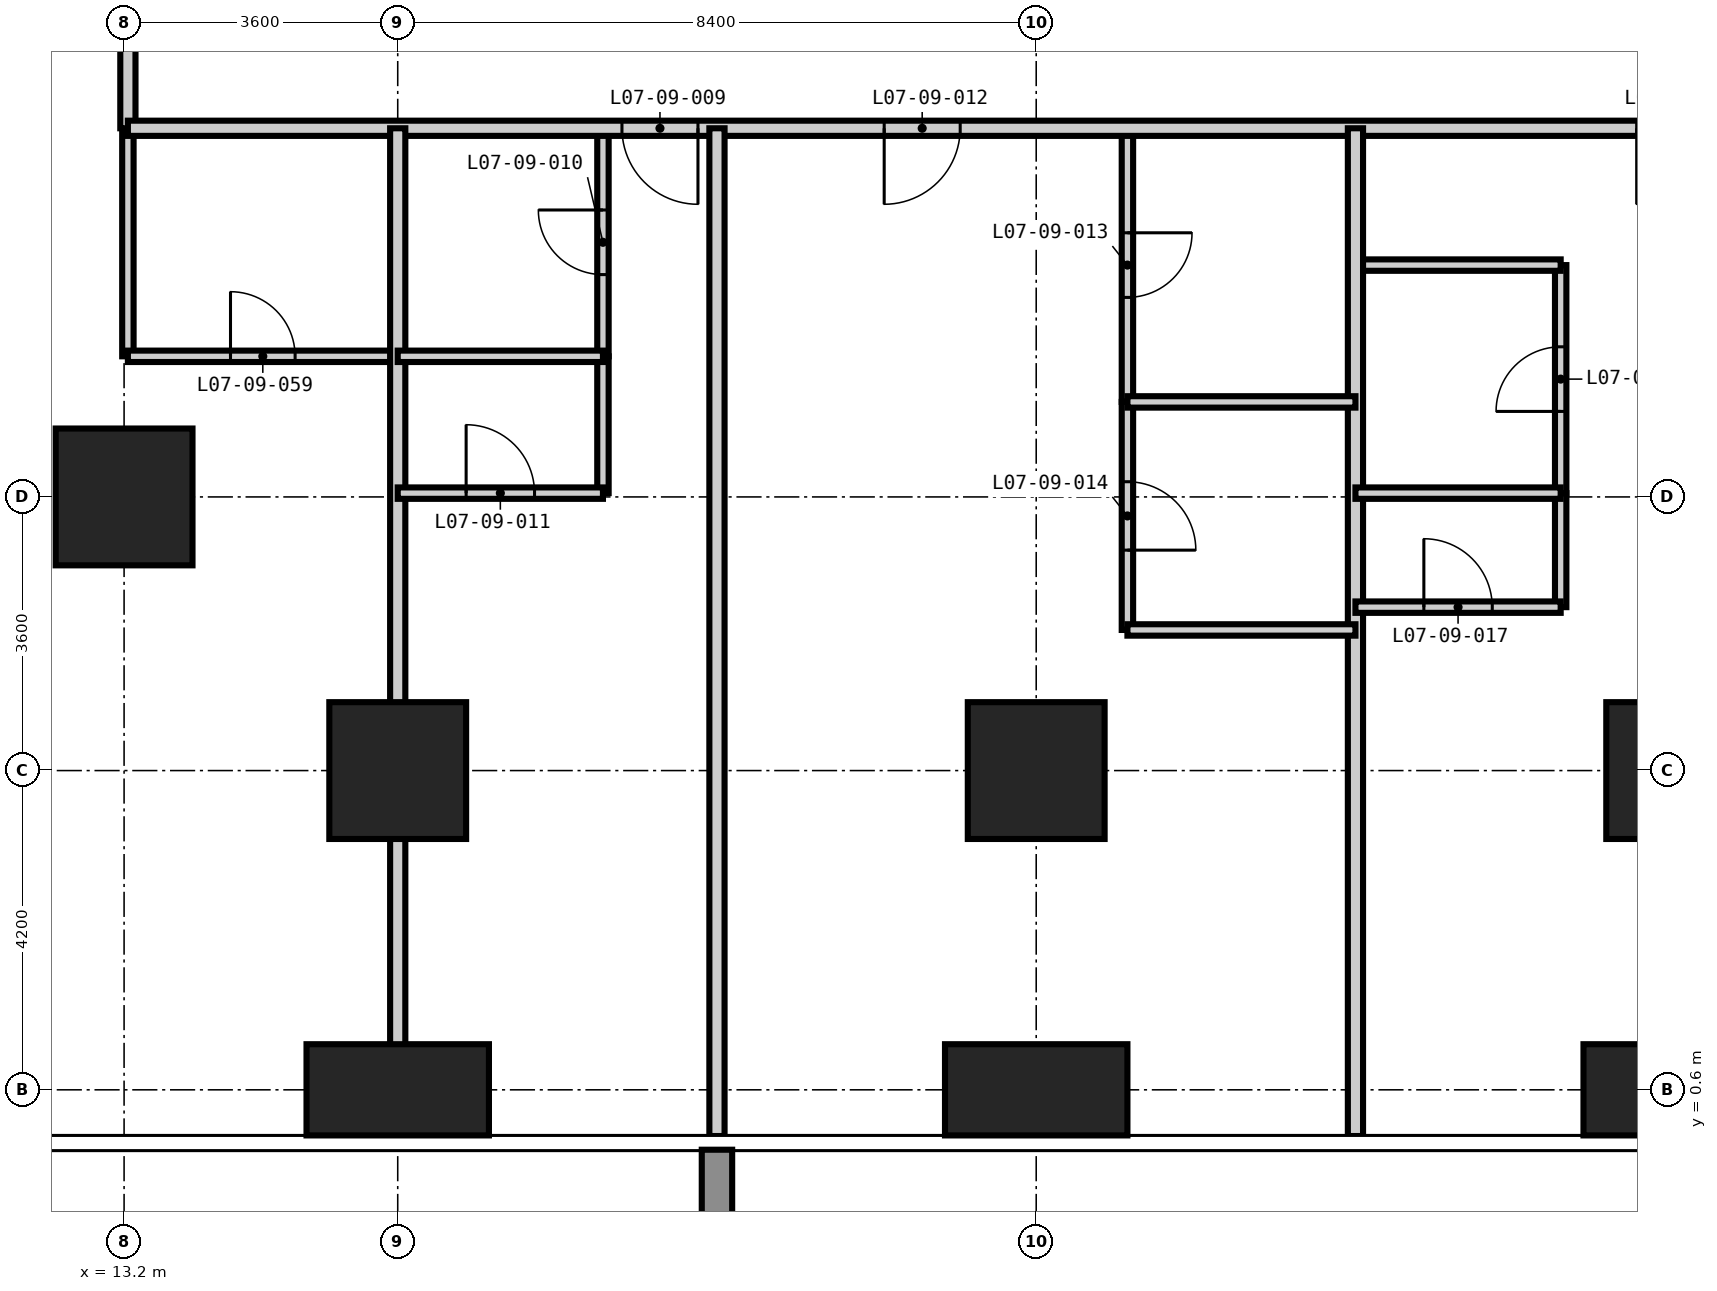
"""IFC4 building model, lengths in metres.
Left out: names, types, materials, properties, quantities, classifications, styles, units other than length and angle.
Written with IfcOpenShell. Run it as: python <this file> out.ifc"""

import sys

from ifc_helpers import new_model, si_unit, direction, frame, frame_2d, origin, origin_2d, place, context, subcontext, project, spatial, rectangle, extrude, element, fill, save


model = new_model("IFC4")
c1 = context("Model", 3, precision=1e-05, world=origin(), true_north=direction((0.0, 1.0)))
c2 = subcontext(c1, "Body", "Model", "MODEL_VIEW")
j1 = project(units=[si_unit("LENGTHUNIT", "METRE"), si_unit("PLANEANGLEUNIT", "RADIAN")], contexts=[c1])
p1 = place(None, origin())
s1 = spatial("IfcSite", under=j1, at=p1, CompositionType="ELEMENT")
p2 = place(p1, origin())
s2 = spatial("IfcBuilding", under=s1, at=p2, CompositionType="ELEMENT")
p3 = place(p2, frame((0.0, 0.0, 34.2)))
s3 = spatial("IfcBuildingStorey", under=s2, at=p3, CompositionType="ELEMENT", Elevation=34.2)
p4 = place(p3, frame((13.2, 8.4, -0.35), z_axis=(0.0, 0.0, 1.0), x_axis=(1.0, 0.0, 0.0)))
e1 = element("IfcColumn", 1, at=p4, inside=s3, PredefinedType="COLUMN", context=c2, shape_type="SweptSolid", body=[
    extrude(rectangle(XDim=1.8, YDim=1.8, at=origin_2d()), origin(), (0.0, 0.0, 1.0), 3.6),
])
p5 = place(p3, frame((16.8, 0.6, -0.35), z_axis=(0.0, 0.0, 1.0), x_axis=(1.0, 0.0, 0.0)))
e2 = element("IfcColumn", 2, at=p5, inside=s3, PredefinedType="COLUMN", context=c2, shape_type="SweptSolid", body=[
    extrude(rectangle(XDim=2.4, YDim=1.2, at=origin_2d()), origin(), (0.0, 0.0, 1.0), 3.6),
])
p6 = place(p3, frame((16.8, 4.8, -0.35), z_axis=(0.0, 0.0, 1.0), x_axis=(1.0, 0.0, 0.0)))
e3 = element("IfcColumn", 3, at=p6, inside=s3, PredefinedType="COLUMN", context=c2, shape_type="SweptSolid", body=[
    extrude(rectangle(XDim=1.8, YDim=1.8, at=origin_2d()), origin(), (0.0, 0.0, 1.0), 3.6),
])
p7 = place(p3, frame((25.2, 0.6, -0.35), z_axis=(0.0, 0.0, 1.0), x_axis=(1.0, 0.0, 0.0)))
e4 = element("IfcColumn", 4, at=p7, inside=s3, PredefinedType="COLUMN", context=c2, shape_type="SweptSolid", body=[
    extrude(rectangle(XDim=2.4, YDim=1.2, at=origin_2d()), origin(), (0.0, 0.0, 1.0), 3.6),
])
p8 = place(p3, frame((25.2, 4.8, -0.35), z_axis=(0.0, 0.0, 1.0), x_axis=(1.0, 0.0, 0.0)))
e5 = element("IfcColumn", 5, at=p8, inside=s3, PredefinedType="COLUMN", context=c2, shape_type="SweptSolid", body=[
    extrude(rectangle(XDim=1.8, YDim=1.8, at=origin_2d()), origin(), (0.0, 0.0, 1.0), 3.6),
])
p9 = place(p3, frame((33.6, 0.6, -0.35), z_axis=(0.0, 0.0, 1.0), x_axis=(1.0, 0.0, 0.0)))
e6 = element("IfcColumn", 6, at=p9, inside=s3, PredefinedType="COLUMN", context=c2, shape_type="SweptSolid", body=[
    extrude(rectangle(XDim=2.4, YDim=1.2, at=origin_2d()), origin(), (0.0, 0.0, 1.0), 3.6),
])
p10 = place(p3, frame((33.6, 4.8, -0.35), z_axis=(0.0, 0.0, 1.0), x_axis=(1.0, 0.0, 0.0)))
e7 = element("IfcColumn", 7, at=p10, inside=s3, PredefinedType="COLUMN", context=c2, shape_type="SweptSolid", body=[
    extrude(rectangle(XDim=1.8, YDim=1.8, at=origin_2d()), origin(), (0.0, 0.0, 1.0), 3.6),
])
p11 = place(p3, frame((13.25, 10.25, 0.0), z_axis=(0.0, 0.0, 1.0), x_axis=(0.0, 1.0, 0.0)))
e8 = element("IfcWall", 8, at=p11, inside=s3, PredefinedType="PARTITIONING", context=c2, shape_type="SweptSolid", body=[
    extrude(rectangle(XDim=3.0, YDim=0.15, at=frame_2d((1.5, 0.0))), origin(), (0.0, 0.0, 1.0), 3.25),
])
p12 = place(p3, frame((19.5, 10.25, 0.0), z_axis=(0.0, 0.0, 1.0), x_axis=(0.0, 1.0, 0.0)))
e9 = element("IfcWall", 9, at=p12, inside=s3, PredefinedType="PARTITIONING", context=c2, shape_type="SweptSolid", body=[
    extrude(rectangle(XDim=3.0, YDim=0.15, at=frame_2d((1.5, 0.0))), origin(), (0.0, 0.0, 1.0), 3.25),
])
p13 = place(p12, frame((1.075, 0.0, 0.0)))
e10 = element("IfcOpeningElement", 10, at=p13, cuts=e9, PredefinedType="OPENING", context=c2, shape_type="SweptSolid", body=[
    extrude(rectangle(XDim=0.85, YDim=2.1, at=frame_2d((0.425, 1.05))), frame((0.0, 0.085, 0.0), z_axis=(0.0, -1.0, 0.0), x_axis=(1.0, 0.0, 0.0)), (0.0, 0.0, 1.0), 0.17),
])
p14 = place(p3, frame((26.4, 9.65, 0.0), z_axis=(0.0, 0.0, 1.0), x_axis=(0.0, 1.0, 0.0)))
e11 = element("IfcWall", 11, at=p14, inside=s3, PredefinedType="PARTITIONING", context=c2, shape_type="SweptSolid", body=[
    extrude(rectangle(XDim=3.6, YDim=0.15, at=frame_2d((1.8, 0.0))), origin(), (0.0, 0.0, 1.0), 3.25),
])
p15 = place(p14, frame((1.375, 0.0, 0.0)))
e12 = element("IfcOpeningElement", 12, at=p15, cuts=e11, PredefinedType="OPENING", context=c2, shape_type="SweptSolid", body=[
    extrude(rectangle(XDim=0.85, YDim=2.1, at=frame_2d((0.425, 1.05))), frame((0.0, 0.085, 0.0), z_axis=(0.0, -1.0, 0.0), x_axis=(1.0, 0.0, 0.0)), (0.0, 0.0, 1.0), 0.17),
])
p16 = place(p3, frame((32.1, 8.45, 0.0), z_axis=(0.0, 0.0, 1.0), x_axis=(0.0, 1.0, 0.0)))
e13 = element("IfcWall", 13, at=p16, inside=s3, PredefinedType="PARTITIONING", context=c2, shape_type="SweptSolid", body=[
    extrude(rectangle(XDim=3.0, YDim=0.15, at=frame_2d((1.5, 0.0))), origin(), (0.0, 0.0, 1.0), 3.25),
])
p17 = place(p16, frame((1.075, 0.0, 0.0)))
e14 = element("IfcOpeningElement", 14, at=p17, cuts=e13, PredefinedType="OPENING", context=c2, shape_type="SweptSolid", body=[
    extrude(rectangle(XDim=0.85, YDim=2.1, at=frame_2d((0.425, 1.05))), frame((0.0, 0.085, 0.0), z_axis=(0.0, -1.0, 0.0), x_axis=(1.0, 0.0, 0.0)), (0.0, 0.0, 1.0), 0.17),
])
p18 = place(p3, frame((13.25, 10.25, 0.0), z_axis=(0.0, 0.0, 1.0), x_axis=(1.0, 0.0, 0.0)))
e15 = element("IfcWall", 15, at=p18, inside=s3, PredefinedType="PARTITIONING", context=c2, shape_type="SweptSolid", body=[
    extrude(rectangle(XDim=3.55, YDim=0.15, at=frame_2d((1.775, 0.0))), origin(), (0.0, 0.0, 1.0), 3.25),
])
p19 = place(p18, frame((1.35, 0.0, 0.0)))
e16 = element("IfcOpeningElement", 16, at=p19, cuts=e15, PredefinedType="OPENING", context=c2, shape_type="SweptSolid", body=[
    extrude(rectangle(XDim=0.85, YDim=2.1, at=frame_2d((0.425, 1.05))), frame((0.0, 0.085, 0.0), z_axis=(0.0, -1.0, 0.0), x_axis=(1.0, 0.0, 0.0)), (0.0, 0.0, 1.0), 0.17),
])
p20 = place(p3, frame((29.4, 11.45, 0.0), z_axis=(0.0, 0.0, 1.0), x_axis=(1.0, 0.0, 0.0)))
e17 = element("IfcWall", 17, at=p20, inside=s3, PredefinedType="PARTITIONING", context=c2, shape_type="SweptSolid", body=[
    extrude(rectangle(XDim=2.7, YDim=0.15, at=frame_2d((1.35, 0.0))), origin(), (0.0, 0.0, 1.0), 3.25),
])
p21 = place(p3, frame((13.25, 13.25, 0.0), z_axis=(0.0, 0.0, 1.0), x_axis=(0.0, 1.0, 0.0)))
e18 = element("IfcWall", 18, at=p21, inside=s3, PredefinedType="PARTITIONING", context=c2, shape_type="SweptSolid", body=[
    extrude(rectangle(XDim=32.0, YDim=0.2, at=frame_2d((16.0, 0.0))), origin(), (0.0, 0.0, 1.0), 3.25),
])
p22 = place(p21, frame((9.35, 0.0, 0.0)))
e19 = element("IfcOpeningElement", 19, at=p22, cuts=e18, PredefinedType="OPENING", context=c2, shape_type="SweptSolid", body=[
    extrude(rectangle(XDim=1.0, YDim=2.2, at=frame_2d((0.5, 1.1))), frame((0.0, 0.11, 0.0), z_axis=(0.0, -1.0, 0.0), x_axis=(1.0, 0.0, 0.0)), (0.0, 0.0, 1.0), 0.22),
])
p23 = place(p21, frame((16.4, 0.0, 0.0)))
e20 = element("IfcOpeningElement", 20, at=p23, cuts=e18, PredefinedType="OPENING", context=c2, shape_type="SweptSolid", body=[
    extrude(rectangle(XDim=1.0, YDim=2.2, at=frame_2d((0.5, 1.1))), frame((0.0, 0.11, 0.0), z_axis=(0.0, -1.0, 0.0), x_axis=(1.0, 0.0, 0.0)), (0.0, 0.0, 1.0), 0.22),
])
p24 = place(p21, frame((23.3, 0.0, 0.0)))
e21 = element("IfcOpeningElement", 21, at=p24, cuts=e18, PredefinedType="OPENING", context=c2, shape_type="SweptSolid", body=[
    extrude(rectangle(XDim=1.0, YDim=2.2, at=frame_2d((0.5, 1.1))), frame((0.0, 0.11, 0.0), z_axis=(0.0, -1.0, 0.0), x_axis=(1.0, 0.0, 0.0)), (0.0, 0.0, 1.0), 0.22),
])
p25 = place(p21, frame((24.8, 0.0, 0.0)))
e22 = element("IfcOpeningElement", 22, at=p25, cuts=e18, PredefinedType="OPENING", context=c2, shape_type="SweptSolid", body=[
    extrude(rectangle(XDim=1.0, YDim=2.2, at=frame_2d((0.5, 1.1))), frame((0.0, 0.11, 0.0), z_axis=(0.0, -1.0, 0.0), x_axis=(1.0, 0.0, 0.0)), (0.0, 0.0, 1.0), 0.22),
])
p26 = place(p21, frame((1.275, 0.0, 0.0)))
e23 = element("IfcOpeningElement", 23, at=p26, cuts=e18, PredefinedType="OPENING", context=c2, shape_type="SweptSolid", body=[
    extrude(rectangle(XDim=1.0, YDim=2.2, at=frame_2d((0.5, 1.1))), frame((0.0, 0.11, 0.0), z_axis=(0.0, -1.0, 0.0), x_axis=(1.0, 0.0, 0.0)), (0.0, 0.0, 1.0), 0.22),
])
p27 = place(p21, frame((29.875, 0.0, 0.0)))
e24 = element("IfcOpeningElement", 24, at=p27, cuts=e18, PredefinedType="OPENING", context=c2, shape_type="SweptSolid", body=[
    extrude(rectangle(XDim=1.0, YDim=2.2, at=frame_2d((0.5, 1.1))), frame((0.0, 0.11, 0.0), z_axis=(0.0, -1.0, 0.0), x_axis=(1.0, 0.0, 0.0)), (0.0, 0.0, 1.0), 0.22),
])
p28 = place(p3, frame((45.85, 13.25, 0.0), z_axis=(0.0, 0.0, 1.0), x_axis=(-1.0, 0.0, 0.0)))
e25 = element("IfcWall", 25, at=p28, inside=s3, PredefinedType="PARTITIONING", context=c2, shape_type="SweptSolid", body=[
    extrude(rectangle(XDim=32.6, YDim=0.2, at=frame_2d((16.3, 0.0))), origin(), (0.0, 0.0, 1.0), 3.25),
])
p29 = place(p28, frame((25.1, 0.0, 0.0)))
e26 = element("IfcOpeningElement", 26, at=p29, cuts=e25, PredefinedType="OPENING", context=c2, shape_type="SweptSolid", body=[
    extrude(rectangle(XDim=1.0, YDim=2.2, at=frame_2d((0.5, 1.1))), frame((0.0, 0.11, 0.0), z_axis=(0.0, -1.0, 0.0), x_axis=(1.0, 0.0, 0.0)), (0.0, 0.0, 1.0), 0.22),
])
p30 = place(p28, frame((21.65, 0.0, 0.0)))
e27 = element("IfcOpeningElement", 27, at=p30, cuts=e25, PredefinedType="OPENING", context=c2, shape_type="SweptSolid", body=[
    extrude(rectangle(XDim=1.0, YDim=2.2, at=frame_2d((0.5, 1.1))), frame((0.0, 0.11, 0.0), z_axis=(0.0, -1.0, 0.0), x_axis=(1.0, 0.0, 0.0)), (0.0, 0.0, 1.0), 0.22),
])
p31 = place(p28, frame((11.75, 0.0, 0.0)))
e28 = element("IfcOpeningElement", 28, at=p31, cuts=e25, PredefinedType="OPENING", context=c2, shape_type="SweptSolid", body=[
    extrude(rectangle(XDim=1.0, YDim=2.2, at=frame_2d((0.5, 1.1))), frame((0.0, 0.11, 0.0), z_axis=(0.0, -1.0, 0.0), x_axis=(1.0, 0.0, 0.0)), (0.0, 0.0, 1.0), 0.22),
])
p32 = place(p28, frame((6.8, 0.0, 0.0)))
e29 = element("IfcOpeningElement", 29, at=p32, cuts=e25, PredefinedType="OPENING", context=c2, shape_type="SweptSolid", body=[
    extrude(rectangle(XDim=1.0, YDim=2.2, at=frame_2d((0.5, 1.1))), frame((0.0, 0.11, 0.0), z_axis=(0.0, -1.0, 0.0), x_axis=(1.0, 0.0, 0.0)), (0.0, 0.0, 1.0), 0.22),
])
for number, where, z_axis, x_axis in (
    (30, (16.8, -0.008, 0.0), (0.0, 0.0, 1.0), (0.0, 1.0, 0.0)),
    (31, (21.0, -0.008, 0.0), (0.0, 0.0, 1.0), (0.0, 1.0, 0.0)),
    (32, (29.4, -0.008, 0.0), (0.0, 0.0, 1.0), (0.0, 1.0, 0.0)),
):
    element("IfcWall", number, at=place(p3, frame(where, z_axis=z_axis, x_axis=x_axis)), inside=s3, PredefinedType="PARTITIONING", context=c2, shape_type="SweptSolid", body=[
        extrude(rectangle(XDim=13.258, YDim=0.2, at=frame_2d((6.629, 0.0))), origin(), (0.0, 0.0, 1.0), 3.25),
    ])
p33 = place(p3, frame((19.5, 8.45, 0.0), z_axis=(0.0, 0.0, 1.0), x_axis=(0.0, 1.0, 0.0)))
e33 = element("IfcWall", 33, at=p33, inside=s3, PredefinedType="PARTITIONING", context=c2, shape_type="SweptSolid", body=[
    extrude(rectangle(XDim=1.8, YDim=0.15, at=frame_2d((0.9, 0.0))), origin(), (0.0, 0.0, 1.0), 3.25),
])
p34 = place(p3, frame((26.4, 6.65, 0.0), z_axis=(0.0, 0.0, 1.0), x_axis=(0.0, 1.0, 0.0)))
e34 = element("IfcWall", 34, at=p34, inside=s3, PredefinedType="PARTITIONING", context=c2, shape_type="SweptSolid", body=[
    extrude(rectangle(XDim=3.0, YDim=0.15, at=frame_2d((1.5, 0.0))), origin(), (0.0, 0.0, 1.0), 3.25),
])
p35 = place(p34, frame((1.05, 0.0, 0.0)))
e35 = element("IfcOpeningElement", 35, at=p35, cuts=e34, PredefinedType="OPENING", context=c2, shape_type="SweptSolid", body=[
    extrude(rectangle(XDim=0.9, YDim=2.1, at=frame_2d((0.45, 1.05))), frame((0.0, 0.085, 0.0), z_axis=(0.0, -1.0, 0.0), x_axis=(1.0, 0.0, 0.0)), (0.0, 0.0, 1.0), 0.17),
])
p36 = place(p3, frame((32.1, 6.95, 0.0), z_axis=(0.0, 0.0, 1.0), x_axis=(0.0, 1.0, 0.0)))
e36 = element("IfcWall", 36, at=p36, inside=s3, PredefinedType="PARTITIONING", context=c2, shape_type="SweptSolid", body=[
    extrude(rectangle(XDim=1.5, YDim=0.15, at=frame_2d((0.75, 0.0))), origin(), (0.0, 0.0, 1.0), 3.25),
])
p37 = place(p3, frame((26.4, 6.65, 0.0), z_axis=(0.0, 0.0, 1.0), x_axis=(1.0, 0.0, 0.0)))
e37 = element("IfcWall", 37, at=p37, inside=s3, PredefinedType="PARTITIONING", context=c2, shape_type="SweptSolid", body=[
    extrude(rectangle(XDim=3.0, YDim=0.15, at=frame_2d((1.5, 0.0))), origin(), (0.0, 0.0, 1.0), 3.25),
])
p38 = place(p3, frame((29.4, 6.95, 0.0), z_axis=(0.0, 0.0, 1.0), x_axis=(1.0, 0.0, 0.0)))
e38 = element("IfcWall", 38, at=p38, inside=s3, PredefinedType="PARTITIONING", context=c2, shape_type="SweptSolid", body=[
    extrude(rectangle(XDim=2.7, YDim=0.15, at=frame_2d((1.35, 0.0))), origin(), (0.0, 0.0, 1.0), 3.25),
])
p39 = place(p38, frame((0.9, 0.0, 0.0)))
e39 = element("IfcOpeningElement", 39, at=p39, cuts=e38, PredefinedType="OPENING", context=c2, shape_type="SweptSolid", body=[
    extrude(rectangle(XDim=0.9, YDim=2.1, at=frame_2d((0.45, 1.05))), frame((0.0, 0.085, 0.0), z_axis=(0.0, -1.0, 0.0), x_axis=(1.0, 0.0, 0.0)), (0.0, 0.0, 1.0), 0.17),
])
p40 = place(p3, frame((16.8, 8.45, 0.0), z_axis=(0.0, 0.0, 1.0), x_axis=(1.0, 0.0, 0.0)))
e40 = element("IfcWall", 40, at=p40, inside=s3, PredefinedType="PARTITIONING", context=c2, shape_type="SweptSolid", body=[
    extrude(rectangle(XDim=2.7, YDim=0.15, at=frame_2d((1.35, 0.0))), origin(), (0.0, 0.0, 1.0), 3.25),
])
p41 = place(p40, frame((0.9, 0.0, 0.0)))
e41 = element("IfcOpeningElement", 41, at=p41, cuts=e40, PredefinedType="OPENING", context=c2, shape_type="SweptSolid", body=[
    extrude(rectangle(XDim=0.9, YDim=2.1, at=frame_2d((0.45, 1.05))), frame((0.0, 0.085, 0.0), z_axis=(0.0, -1.0, 0.0), x_axis=(1.0, 0.0, 0.0)), (0.0, 0.0, 1.0), 0.17),
])
p42 = place(p3, frame((29.4, 8.45, 0.0), z_axis=(0.0, 0.0, 1.0), x_axis=(1.0, 0.0, 0.0)))
e42 = element("IfcWall", 42, at=p42, inside=s3, PredefinedType="PARTITIONING", context=c2, shape_type="SweptSolid", body=[
    extrude(rectangle(XDim=2.7, YDim=0.15, at=frame_2d((1.35, 0.0))), origin(), (0.0, 0.0, 1.0), 3.25),
])
p43 = place(p3, frame((26.4, 9.65, 0.0), z_axis=(0.0, 0.0, 1.0), x_axis=(1.0, 0.0, 0.0)))
e43 = element("IfcWall", 43, at=p43, inside=s3, PredefinedType="PARTITIONING", context=c2, shape_type="SweptSolid", body=[
    extrude(rectangle(XDim=3.0, YDim=0.15, at=frame_2d((1.5, 0.0))), origin(), (0.0, 0.0, 1.0), 3.25),
])
p44 = place(p3, frame((16.8, 10.25, 0.0), z_axis=(0.0, 0.0, 1.0), x_axis=(1.0, 0.0, 0.0)))
e44 = element("IfcWall", 44, at=p44, inside=s3, PredefinedType="PARTITIONING", context=c2, shape_type="SweptSolid", body=[
    extrude(rectangle(XDim=2.7, YDim=0.15, at=frame_2d((1.35, 0.0))), origin(), (0.0, 0.0, 1.0), 3.25),
])
p45 = place(p29, origin())
e45 = element("IfcDoor", 45, at=p45, inside=s3, OperationType="SINGLE_SWING_LEFT", PredefinedType="DOOR", context=c2, shape_type="SweptSolid", body=[
    extrude(rectangle(XDim=1.0, YDim=2.2, at=frame_2d((0.5, 1.1))), frame((0.0, 0.025, 0.0), z_axis=(0.0, -1.0, 0.0), x_axis=(1.0, 0.0, 0.0)), (0.0, 0.0, 1.0), 0.05),
])
fill(e26, e45)
p46 = place(p13, origin())
e46 = element("IfcDoor", 46, at=p46, inside=s3, OperationType="SINGLE_SWING_RIGHT", PredefinedType="DOOR", context=c2, shape_type="SweptSolid", body=[
    extrude(rectangle(XDim=0.85, YDim=2.1, at=frame_2d((0.425, 1.05))), frame((0.0, 0.025, 0.0), z_axis=(0.0, -1.0, 0.0), x_axis=(1.0, 0.0, 0.0)), (0.0, 0.0, 1.0), 0.05),
])
fill(e10, e46)
p47 = place(p41, origin())
e47 = element("IfcDoor", 47, at=p47, inside=s3, OperationType="SINGLE_SWING_LEFT", PredefinedType="DOOR", context=c2, shape_type="SweptSolid", body=[
    extrude(rectangle(XDim=0.9, YDim=2.1, at=frame_2d((0.45, 1.05))), frame((0.0, 0.025, 0.0), z_axis=(0.0, -1.0, 0.0), x_axis=(1.0, 0.0, 0.0)), (0.0, 0.0, 1.0), 0.05),
])
fill(e41, e47)
p48 = place(p30, origin())
e48 = element("IfcDoor", 48, at=p48, inside=s3, OperationType="SINGLE_SWING_RIGHT", PredefinedType="DOOR", context=c2, shape_type="SweptSolid", body=[
    extrude(rectangle(XDim=1.0, YDim=2.2, at=frame_2d((0.5, 1.1))), frame((0.0, 0.025, 0.0), z_axis=(0.0, -1.0, 0.0), x_axis=(1.0, 0.0, 0.0)), (0.0, 0.0, 1.0), 0.05),
])
fill(e27, e48)
p49 = place(p15, frame((0.85, 0.0, 0.0), z_axis=(0.0, 0.0, 1.0), x_axis=(-1.0, 0.0, 0.0)))
e49 = element("IfcDoor", 49, at=p49, inside=s3, OperationType="SINGLE_SWING_LEFT", PredefinedType="DOOR", context=c2, shape_type="SweptSolid", body=[
    extrude(rectangle(XDim=0.85, YDim=2.1, at=frame_2d((0.425, 1.05))), frame((0.0, 0.025, 0.0), z_axis=(0.0, -1.0, 0.0), x_axis=(1.0, 0.0, 0.0)), (0.0, 0.0, 1.0), 0.05),
])
fill(e12, e49)
p50 = place(p35, frame((0.9, 0.0, 0.0), z_axis=(0.0, 0.0, 1.0), x_axis=(-1.0, 0.0, 0.0)))
e50 = element("IfcDoor", 50, at=p50, inside=s3, OperationType="SINGLE_SWING_RIGHT", PredefinedType="DOOR", context=c2, shape_type="SweptSolid", body=[
    extrude(rectangle(XDim=0.9, YDim=2.1, at=frame_2d((0.45, 1.05))), frame((0.0, 0.025, 0.0), z_axis=(0.0, -1.0, 0.0), x_axis=(1.0, 0.0, 0.0)), (0.0, 0.0, 1.0), 0.05),
])
fill(e35, e50)
p51 = place(p17, origin())
e51 = element("IfcDoor", 51, at=p51, inside=s3, OperationType="SINGLE_SWING_LEFT", PredefinedType="DOOR", context=c2, shape_type="SweptSolid", body=[
    extrude(rectangle(XDim=0.85, YDim=2.1, at=frame_2d((0.425, 1.05))), frame((0.0, 0.025, 0.0), z_axis=(0.0, -1.0, 0.0), x_axis=(1.0, 0.0, 0.0)), (0.0, 0.0, 1.0), 0.05),
])
fill(e14, e51)
p52 = place(p39, origin())
e52 = element("IfcDoor", 52, at=p52, inside=s3, OperationType="SINGLE_SWING_LEFT", PredefinedType="DOOR", context=c2, shape_type="SweptSolid", body=[
    extrude(rectangle(XDim=0.9, YDim=2.1, at=frame_2d((0.45, 1.05))), frame((0.0, 0.025, 0.0), z_axis=(0.0, -1.0, 0.0), x_axis=(1.0, 0.0, 0.0)), (0.0, 0.0, 1.0), 0.05),
])
fill(e39, e52)
p53 = place(p19, origin())
e53 = element("IfcDoor", 53, at=p53, inside=s3, OperationType="SINGLE_SWING_LEFT", PredefinedType="DOOR", context=c2, shape_type="SweptSolid", body=[
    extrude(rectangle(XDim=0.85, YDim=2.1, at=frame_2d((0.425, 1.05))), frame((0.0, 0.025, 0.0), z_axis=(0.0, -1.0, 0.0), x_axis=(1.0, 0.0, 0.0)), (0.0, 0.0, 1.0), 0.05),
])
fill(e16, e53)
save(model, sys.argv[1])
